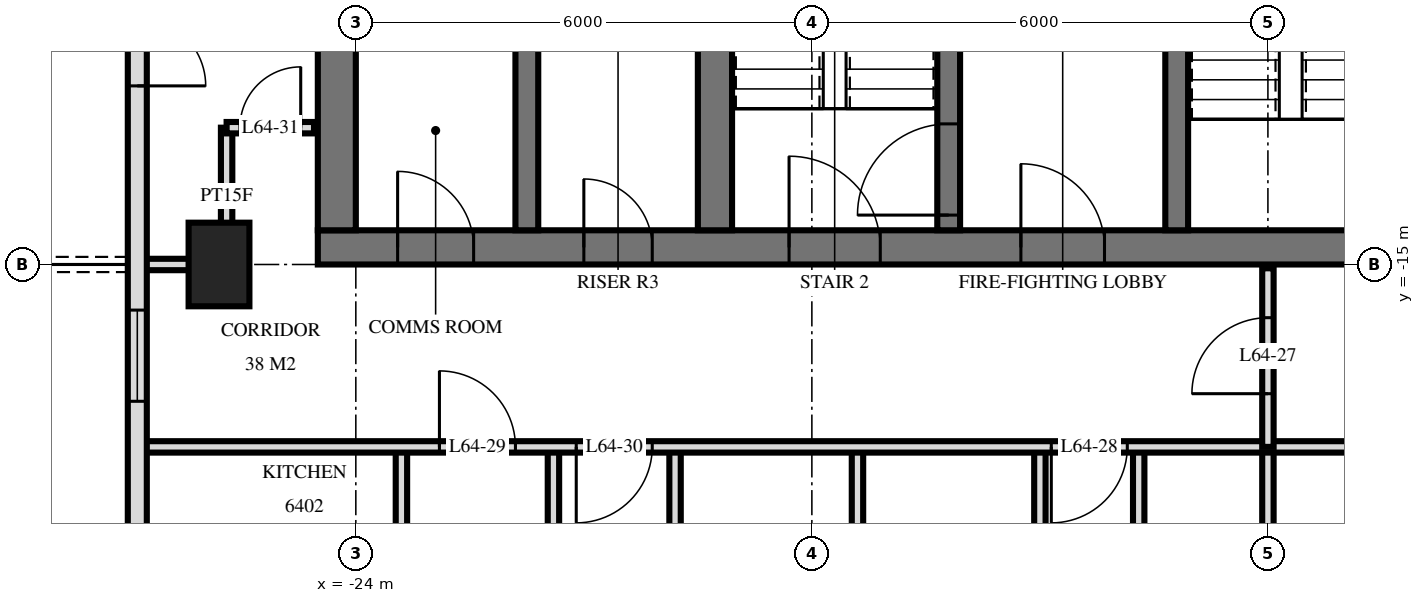
"""IFC4 building model, lengths in metres.
Left out: names, types, materials, properties, quantities, classifications, styles, units other than length and angle.
Written with IfcOpenShell. Run it as: python <this file> out.ifc"""

import sys

from ifc_helpers import new_model, si_unit, direction, frame, frame_2d, origin, origin_2d, place, context, subcontext, project, spatial, rectangle, extrude, element, fill, save


model = new_model("IFC4")
c1 = context("Model", 3, precision=1e-05, world=origin(), true_north=direction((0.0, 1.0)))
c2 = subcontext(c1, "Body", "Model", "MODEL_VIEW")
j1 = project(units=[si_unit("LENGTHUNIT", "METRE"), si_unit("PLANEANGLEUNIT", "RADIAN")], contexts=[c1])
p1 = place(None, origin())
s1 = spatial("IfcSite", under=j1, at=p1, CompositionType="ELEMENT")
p2 = place(p1, origin())
s2 = spatial("IfcBuilding", under=s1, at=p2, CompositionType="ELEMENT")
p3 = place(p2, frame((0.0, 0.0, 243.1)))
s3 = spatial("IfcBuildingStorey", under=s2, at=p3, CompositionType="ELEMENT", Elevation=243.1)
p4 = place(p3, frame((-25.8, -15.0, 0.0), z_axis=(0.0, 0.0, 1.0), x_axis=(0.0, 1.0, 0.0)))
e1 = element("IfcColumn", 1, at=p4, inside=s3, PredefinedType="COLUMN", context=c2, shape_type="SweptSolid", body=[
    extrude(rectangle(XDim=1.1, YDim=0.8, at=origin_2d()), origin(), (0.0, 0.0, 1.0), 3.5),
])
p5 = place(p3, frame((-24.5, -14.775, 0.0), z_axis=(0.0, 0.0, 1.0), x_axis=(1.0, 0.0, 0.0)))
e2 = element("IfcWall", 2, at=p5, inside=s3, PredefinedType="SHEAR", context=c2, shape_type="SweptSolid", body=[
    extrude(rectangle(XDim=14.5, YDim=0.45, at=frame_2d((7.25, 0.0))), origin(), (0.0, 0.0, 1.0), 3.5),
])
p6 = place(p5, frame((6.2, 0.0, 0.0)))
e3 = element("IfcOpeningElement", 3, at=p6, cuts=e2, PredefinedType="OPENING", context=c2, shape_type="SweptSolid", body=[
    extrude(rectangle(XDim=1.2, YDim=2.1, at=frame_2d((0.6, 1.05))), frame((0.0, 0.235, 0.0), z_axis=(0.0, -1.0, 0.0), x_axis=(1.0, 0.0, 0.0)), (0.0, 0.0, 1.0), 0.47),
])
p7 = place(p5, frame((9.25, 0.0, 0.0)))
e4 = element("IfcOpeningElement", 4, at=p7, cuts=e2, PredefinedType="OPENING", context=c2, shape_type="SweptSolid", body=[
    extrude(rectangle(XDim=1.1, YDim=2.1, at=frame_2d((0.55, 1.05))), frame((0.0, 0.235, 0.0), z_axis=(0.0, -1.0, 0.0), x_axis=(1.0, 0.0, 0.0)), (0.0, 0.0, 1.0), 0.47),
])
p8 = place(p5, frame((3.5, 0.0, 0.0)))
e5 = element("IfcOpeningElement", 5, at=p8, cuts=e2, PredefinedType="OPENING", context=c2, shape_type="SweptSolid", body=[
    extrude(rectangle(XDim=0.9, YDim=2.1, at=frame_2d((0.45, 1.05))), frame((0.0, 0.235, 0.0), z_axis=(0.0, -1.0, 0.0), x_axis=(1.0, 0.0, 0.0)), (0.0, 0.0, 1.0), 0.47),
])
p9 = place(p5, frame((1.05, 0.0, 0.0)))
e6 = element("IfcOpeningElement", 6, at=p9, cuts=e2, PredefinedType="OPENING", context=c2, shape_type="SweptSolid", body=[
    extrude(rectangle(XDim=1.0, YDim=2.1, at=frame_2d((0.5, 1.05))), frame((0.0, 0.235, 0.0), z_axis=(0.0, -1.0, 0.0), x_axis=(1.0, 0.0, 0.0)), (0.0, 0.0, 1.0), 0.47),
])
p10 = place(p3, frame((-24.25, -14.55, 0.0), z_axis=(0.0, 0.0, 1.0), x_axis=(0.0, 1.0, 0.0)))
e7 = element("IfcWall", 7, at=p10, inside=s3, PredefinedType="SHEAR", context=c2, shape_type="SweptSolid", body=[
    extrude(rectangle(XDim=14.1, YDim=0.5, at=frame_2d((7.05, 0.0))), origin(), (0.0, 0.0, 1.0), 3.5),
])
p11 = place(p3, frame((-13.2, -14.55, 0.0), z_axis=(0.0, 0.0, 1.0), x_axis=(0.0, 1.0, 0.0)))
e8 = element("IfcWall", 8, at=p11, inside=s3, PredefinedType="SHEAR", context=c2, shape_type="SweptSolid", body=[
    extrude(rectangle(XDim=5.4, YDim=0.3, at=frame_2d((2.7, 0.0))), origin(), (0.0, 0.0, 1.0), 3.5),
])
p12 = place(p11, frame((4.0, 0.0, 0.0)))
e9 = element("IfcOpeningElement", 9, at=p12, cuts=e8, PredefinedType="OPENING", context=c2, shape_type="SweptSolid", body=[
    extrude(rectangle(XDim=1.2, YDim=2.1, at=frame_2d((0.6, 1.05))), frame((0.0, 0.16, 0.0), z_axis=(0.0, -1.0, 0.0), x_axis=(1.0, 0.0, 0.0)), (0.0, 0.0, 1.0), 0.32),
])
p13 = place(p3, frame((-16.2, -14.55, 0.0), z_axis=(0.0, 0.0, 1.0), x_axis=(0.0, 1.0, 0.0)))
e10 = element("IfcWall", 10, at=p13, inside=s3, PredefinedType="SHEAR", context=c2, shape_type="SweptSolid", body=[
    extrude(rectangle(XDim=5.4, YDim=0.3, at=frame_2d((2.7, 0.0))), origin(), (0.0, 0.0, 1.0), 3.5),
])
p14 = place(p13, frame((0.2, 0.0, 0.0)))
e11 = element("IfcOpeningElement", 11, at=p14, cuts=e10, PredefinedType="OPENING", context=c2, shape_type="SweptSolid", body=[
    extrude(rectangle(XDim=1.2, YDim=2.1, at=frame_2d((0.6, 1.05))), frame((0.0, 0.16, 0.0), z_axis=(0.0, -1.0, 0.0), x_axis=(1.0, 0.0, 0.0)), (0.0, 0.0, 1.0), 0.32),
])
p15 = place(p3, frame((-19.275, -14.55, 0.0), z_axis=(0.0, 0.0, 1.0), x_axis=(0.0, 1.0, 0.0)))
e12 = element("IfcWall", 12, at=p15, inside=s3, PredefinedType="SHEAR", context=c2, shape_type="SweptSolid", body=[
    extrude(rectangle(XDim=5.4, YDim=0.45, at=frame_2d((2.7, 0.0))), origin(), (0.0, 0.0, 1.0), 3.5),
])
p16 = place(p3, frame((-21.75, -14.55, 0.0), z_axis=(0.0, 0.0, 1.0), x_axis=(0.0, 1.0, 0.0)))
e13 = element("IfcWall", 13, at=p16, inside=s3, PredefinedType="SHEAR", context=c2, shape_type="SweptSolid", body=[
    extrude(rectangle(XDim=5.4, YDim=0.3, at=frame_2d((2.7, 0.0))), origin(), (0.0, 0.0, 1.0), 3.5),
])
p17 = place(p3, frame((-26.875, -3.325, 0.0), z_axis=(0.0, 0.0, 1.0), x_axis=(0.0, -1.0, 0.0)))
e14 = element("IfcWall", 14, at=p17, inside=s3, PredefinedType="SOLIDWALL", context=c2, shape_type="SweptSolid", body=[
    extrude(rectangle(XDim=21.551, YDim=0.25, at=frame_2d((10.775, 0.0))), origin(), (0.0, 0.0, 1.0), 3.2),
])
p18 = place(p17, frame((7.525, 0.0, 0.0)))
e15 = element("IfcOpeningElement", 15, at=p18, cuts=e14, PredefinedType="OPENING", context=c2, shape_type="SweptSolid", body=[
    extrude(rectangle(XDim=1.8, YDim=2.4, at=frame_2d((0.9, 1.2))), frame((0.0, 0.135, 0.0), z_axis=(0.0, -1.0, 0.0), x_axis=(1.0, 0.0, 0.0)), (0.0, 0.0, 1.0), 0.27),
])
p19 = place(p17, frame((12.275, 0.0, 0.9)))
e16 = element("IfcOpeningElement", 16, at=p19, cuts=e14, PredefinedType="OPENING", context=c2, shape_type="SweptSolid", body=[
    extrude(rectangle(XDim=1.2, YDim=1.5, at=frame_2d((0.6, 0.75))), frame((0.0, 0.135, 0.0), z_axis=(0.0, -1.0, 0.0), x_axis=(1.0, 0.0, 0.0)), (0.0, 0.0, 1.0), 0.27),
])
p20 = place(p17, frame((15.275, 0.0, 0.0)))
e17 = element("IfcOpeningElement", 17, at=p20, cuts=e14, PredefinedType="OPENING", context=c2, shape_type="SweptSolid", body=[
    extrude(rectangle(XDim=1.8, YDim=2.4, at=frame_2d((0.9, 1.2))), frame((0.0, 0.135, 0.0), z_axis=(0.0, -1.0, 0.0), x_axis=(1.0, 0.0, 0.0)), (0.0, 0.0, 1.0), 0.27),
])
p21 = place(p17, frame((18.875, 0.0, 0.0)))
e18 = element("IfcOpeningElement", 18, at=p21, cuts=e14, PredefinedType="OPENING", context=c2, shape_type="SweptSolid", body=[
    extrude(rectangle(XDim=1.8, YDim=2.4, at=frame_2d((0.9, 1.2))), frame((0.0, 0.135, 0.0), z_axis=(0.0, -1.0, 0.0), x_axis=(1.0, 0.0, 0.0)), (0.0, 0.0, 1.0), 0.27),
])
p22 = place(p3, frame((-12.0, -17.4, 0.0), z_axis=(0.0, 0.0, 1.0), x_axis=(0.0, 1.0, 0.0)))
e19 = element("IfcWall", 19, at=p22, inside=s3, PredefinedType="PARTITIONING", context=c2, shape_type="SweptSolid", body=[
    extrude(rectangle(XDim=2.35, YDim=0.15, at=frame_2d((1.175, 0.0))), origin(), (0.0, 0.0, 1.0), 3.22),
])
p23 = place(p22, frame((0.7, 0.0, 0.0)))
e20 = element("IfcOpeningElement", 20, at=p23, cuts=e19, PredefinedType="OPENING", context=c2, shape_type="SweptSolid", body=[
    extrude(rectangle(XDim=1.0, YDim=2.1, at=frame_2d((0.5, 1.05))), frame((0.0, 0.085, 0.0), z_axis=(0.0, -1.0, 0.0), x_axis=(1.0, 0.0, 0.0)), (0.0, 0.0, 1.0), 0.17),
])
p24 = place(p3, frame((-12.0, -29.22, 0.0), z_axis=(0.0, 0.0, 1.0), x_axis=(0.0, 1.0, 0.0)))
e21 = element("IfcWall", 21, at=p24, inside=s3, PredefinedType="PARTITIONING", context=c2, shape_type="SweptSolid", body=[
    extrude(rectangle(XDim=11.82, YDim=0.15, at=frame_2d((5.91, 0.0))), origin(), (0.0, 0.0, 1.0), 3.22),
])
p25 = place(p3, frame((-13.7, -21.6, 0.0), z_axis=(0.0, 0.0, 1.0), x_axis=(0.0, 1.0, 0.0)))
e22 = element("IfcWall", 22, at=p25, inside=s3, PredefinedType="PARTITIONING", context=c2, shape_type="SweptSolid", body=[
    extrude(rectangle(XDim=4.2, YDim=0.15, at=frame_2d((2.1, 0.0))), origin(), (0.0, 0.0, 1.0), 3.22),
])
p26 = place(p25, frame((1.72, 0.0, 0.0)))
e23 = element("IfcOpeningElement", 23, at=p26, cuts=e22, PredefinedType="OPENING", context=c2, shape_type="SweptSolid", body=[
    extrude(rectangle(XDim=0.8, YDim=2.1, at=frame_2d((0.4, 1.05))), frame((0.0, 0.085, 0.0), z_axis=(0.0, -1.0, 0.0), x_axis=(1.0, 0.0, 0.0)), (0.0, 0.0, 1.0), 0.17),
])
p27 = place(p3, frame((-15.0, -29.22, 0.0), z_axis=(0.0, 0.0, 1.0), x_axis=(0.0, 1.0, 0.0)))
e24 = element("IfcWall", 24, at=p27, inside=s3, PredefinedType="PARTITIONING", context=c2, shape_type="SweptSolid", body=[
    extrude(rectangle(XDim=11.82, YDim=0.15, at=frame_2d((5.91, 0.0))), origin(), (0.0, 0.0, 1.0), 3.22),
])
for number, where, z_axis, x_axis in (
    (25, (-17.4, -21.6, 0.0), (0.0, 0.0, 1.0), (0.0, 1.0, 0.0)),
    (26, (-19.8, -21.6, 0.0), (0.0, 0.0, 1.0), (0.0, 1.0, 0.0)),
    (27, (-21.4, -21.6, 0.0), (0.0, 0.0, 1.0), (0.0, 1.0, 0.0)),
):
    element("IfcWall", number, at=place(p3, frame(where, z_axis=z_axis, x_axis=x_axis)), inside=s3, PredefinedType="PARTITIONING", context=c2, shape_type="SweptSolid", body=[
        extrude(rectangle(XDim=4.2, YDim=0.15, at=frame_2d((2.1, 0.0))), origin(), (0.0, 0.0, 1.0), 3.22),
    ])
p28 = place(p3, frame((-23.4, -21.6, 0.0), z_axis=(0.0, 0.0, 1.0), x_axis=(0.0, 1.0, 0.0)))
e28 = element("IfcWall", 28, at=p28, inside=s3, PredefinedType="PARTITIONING", context=c2, shape_type="SweptSolid", body=[
    extrude(rectangle(XDim=4.2, YDim=0.15, at=frame_2d((2.1, 0.0))), origin(), (0.0, 0.0, 1.0), 3.22),
])
p29 = place(p28, frame((1.58, 0.0, 0.0)))
e29 = element("IfcOpeningElement", 29, at=p29, cuts=e28, PredefinedType="OPENING", context=c2, shape_type="SweptSolid", body=[
    extrude(rectangle(XDim=1.0, YDim=2.1, at=frame_2d((0.5, 1.05))), frame((0.0, 0.085, 0.0), z_axis=(0.0, -1.0, 0.0), x_axis=(1.0, 0.0, 0.0)), (0.0, 0.0, 1.0), 0.17),
])
p30 = place(p3, frame((-25.7, -15.0, 0.0), z_axis=(0.0, 0.0, 1.0), x_axis=(0.0, 1.0, 0.0)))
e30 = element("IfcWall", 30, at=p30, inside=s3, PredefinedType="PARTITIONING", context=c2, shape_type="SweptSolid", body=[
    extrude(rectangle(XDim=1.8, YDim=0.15, at=frame_2d((0.9, 0.0))), origin(), (0.0, 0.0, 1.0), 3.22),
])
p31 = place(p3, frame((-26.82, -17.4, 0.0), z_axis=(0.0, 0.0, 1.0), x_axis=(1.0, 0.0, 0.0)))
e31 = element("IfcWall", 31, at=p31, inside=s3, PredefinedType="PARTITIONING", context=c2, shape_type="SweptSolid", body=[
    extrude(rectangle(XDim=53.64, YDim=0.15, at=frame_2d((26.82, 0.0))), origin(), (0.0, 0.0, 1.0), 3.22),
])
p32 = place(p31, frame((11.97, 0.0, 0.0)))
e32 = element("IfcOpeningElement", 32, at=p32, cuts=e31, PredefinedType="OPENING", context=c2, shape_type="SweptSolid", body=[
    extrude(rectangle(XDim=1.0, YDim=2.1, at=frame_2d((0.5, 1.05))), frame((0.0, 0.085, 0.0), z_axis=(0.0, -1.0, 0.0), x_axis=(1.0, 0.0, 0.0)), (0.0, 0.0, 1.0), 0.17),
])
p33 = place(p31, frame((3.92, 0.0, 0.0)))
e33 = element("IfcOpeningElement", 33, at=p33, cuts=e31, PredefinedType="OPENING", context=c2, shape_type="SweptSolid", body=[
    extrude(rectangle(XDim=1.0, YDim=2.1, at=frame_2d((0.5, 1.05))), frame((0.0, 0.085, 0.0), z_axis=(0.0, -1.0, 0.0), x_axis=(1.0, 0.0, 0.0)), (0.0, 0.0, 1.0), 0.17),
])
p34 = place(p31, frame((5.72, 0.0, 0.0)))
e34 = element("IfcOpeningElement", 34, at=p34, cuts=e31, PredefinedType="OPENING", context=c2, shape_type="SweptSolid", body=[
    extrude(rectangle(XDim=1.0, YDim=2.1, at=frame_2d((0.5, 1.05))), frame((0.0, 0.085, 0.0), z_axis=(0.0, -1.0, 0.0), x_axis=(1.0, 0.0, 0.0)), (0.0, 0.0, 1.0), 0.17),
])
p35 = place(p31, frame((47.72, 0.0, 0.0)))
e35 = element("IfcOpeningElement", 35, at=p35, cuts=e31, PredefinedType="OPENING", context=c2, shape_type="SweptSolid", body=[
    extrude(rectangle(XDim=1.0, YDim=2.1, at=frame_2d((0.5, 1.05))), frame((0.0, 0.085, 0.0), z_axis=(0.0, -1.0, 0.0), x_axis=(1.0, 0.0, 0.0)), (0.0, 0.0, 1.0), 0.17),
])
p36 = place(p31, frame((51.02, 0.0, 0.0)))
e36 = element("IfcOpeningElement", 36, at=p36, cuts=e31, PredefinedType="OPENING", context=c2, shape_type="SweptSolid", body=[
    extrude(rectangle(XDim=1.0, YDim=2.1, at=frame_2d((0.5, 1.05))), frame((0.0, 0.085, 0.0), z_axis=(0.0, -1.0, 0.0), x_axis=(1.0, 0.0, 0.0)), (0.0, 0.0, 1.0), 0.17),
])
p37 = place(p31, frame((17.32, 0.0, 0.0)))
e37 = element("IfcOpeningElement", 37, at=p37, cuts=e31, PredefinedType="OPENING", context=c2, shape_type="SweptSolid", body=[
    extrude(rectangle(XDim=1.0, YDim=2.1, at=frame_2d((0.5, 1.05))), frame((0.0, 0.085, 0.0), z_axis=(0.0, -1.0, 0.0), x_axis=(1.0, 0.0, 0.0)), (0.0, 0.0, 1.0), 0.17),
])
p38 = place(p31, frame((23.32, 0.0, 0.0)))
e38 = element("IfcOpeningElement", 38, at=p38, cuts=e31, PredefinedType="OPENING", context=c2, shape_type="SweptSolid", body=[
    extrude(rectangle(XDim=1.0, YDim=2.1, at=frame_2d((0.5, 1.05))), frame((0.0, 0.085, 0.0), z_axis=(0.0, -1.0, 0.0), x_axis=(1.0, 0.0, 0.0)), (0.0, 0.0, 1.0), 0.17),
])
p39 = place(p31, frame((29.32, 0.0, 0.0)))
e39 = element("IfcOpeningElement", 39, at=p39, cuts=e31, PredefinedType="OPENING", context=c2, shape_type="SweptSolid", body=[
    extrude(rectangle(XDim=1.0, YDim=2.1, at=frame_2d((0.5, 1.05))), frame((0.0, 0.085, 0.0), z_axis=(0.0, -1.0, 0.0), x_axis=(1.0, 0.0, 0.0)), (0.0, 0.0, 1.0), 0.17),
])
p40 = place(p31, frame((35.32, 0.0, 0.0)))
e40 = element("IfcOpeningElement", 40, at=p40, cuts=e31, PredefinedType="OPENING", context=c2, shape_type="SweptSolid", body=[
    extrude(rectangle(XDim=1.0, YDim=2.1, at=frame_2d((0.5, 1.05))), frame((0.0, 0.085, 0.0), z_axis=(0.0, -1.0, 0.0), x_axis=(1.0, 0.0, 0.0)), (0.0, 0.0, 1.0), 0.17),
])
p41 = place(p3, frame((-26.82, -15.0, 0.0), z_axis=(0.0, 0.0, 1.0), x_axis=(1.0, 0.0, 0.0)))
e41 = element("IfcWall", 41, at=p41, inside=s3, PredefinedType="PARTITIONING", context=c2, shape_type="SweptSolid", body=[
    extrude(rectangle(XDim=1.12, YDim=0.15, at=frame_2d((0.56, 0.0))), origin(), (0.0, 0.0, 1.0), 3.22),
])
p42 = place(p3, frame((-25.7, -13.2, 0.0), z_axis=(0.0, 0.0, 1.0), x_axis=(1.0, 0.0, 0.0)))
e42 = element("IfcWall", 42, at=p42, inside=s3, PredefinedType="PARTITIONING", context=c2, shape_type="SweptSolid", body=[
    extrude(rectangle(XDim=1.15, YDim=0.15, at=frame_2d((0.575, 0.0))), origin(), (0.0, 0.0, 1.0), 3.22),
])
p43 = place(p42, frame((0.175, 0.0, 0.0)))
e43 = element("IfcOpeningElement", 43, at=p43, cuts=e42, PredefinedType="OPENING", context=c2, shape_type="SweptSolid", body=[
    extrude(rectangle(XDim=0.8, YDim=2.1, at=frame_2d((0.4, 1.05))), frame((0.0, 0.085, 0.0), z_axis=(0.0, -1.0, 0.0), x_axis=(1.0, 0.0, 0.0)), (0.0, 0.0, 1.0), 0.17),
])
p44 = place(p18, origin())
e44 = element("IfcDoor", 44, at=p44, inside=s3, OperationType="DOUBLE_DOOR_SINGLE_SWING", PredefinedType="DOOR", context=c2, shape_type="SweptSolid", body=[
    extrude(rectangle(XDim=1.8, YDim=2.4, at=frame_2d((0.9, 1.2))), frame((0.0, 0.025, 0.0), z_axis=(0.0, -1.0, 0.0), x_axis=(1.0, 0.0, 0.0)), (0.0, 0.0, 1.0), 0.05),
])
fill(e15, e44)
p45 = place(p19, origin())
e45 = element("IfcWindow", 45, at=p45, inside=s3, PartitioningType="SINGLE_PANEL", PredefinedType="WINDOW", context=c2, shape_type="SweptSolid", body=[
    extrude(rectangle(XDim=1.2, YDim=1.5, at=frame_2d((0.6, 0.75))), frame((0.0, 0.03, 0.0), z_axis=(0.0, -1.0, 0.0), x_axis=(1.0, 0.0, 0.0)), (0.0, 0.0, 1.0), 0.06),
])
fill(e16, e45)
p46 = place(p6, origin())
e46 = element("IfcDoor", 46, at=p46, inside=s3, OperationType="SINGLE_SWING_RIGHT", PredefinedType="DOOR", context=c2, shape_type="SweptSolid", body=[
    extrude(rectangle(XDim=1.2, YDim=2.1, at=frame_2d((0.6, 1.05))), frame((0.0, 0.025, 0.0), z_axis=(0.0, -1.0, 0.0), x_axis=(1.0, 0.0, 0.0)), (0.0, 0.0, 1.0), 0.05),
])
fill(e3, e46)
p47 = place(p7, origin())
e47 = element("IfcDoor", 47, at=p47, inside=s3, OperationType="SINGLE_SWING_RIGHT", PredefinedType="DOOR", context=c2, shape_type="SweptSolid", body=[
    extrude(rectangle(XDim=1.1, YDim=2.1, at=frame_2d((0.55, 1.05))), frame((0.0, 0.025, 0.0), z_axis=(0.0, -1.0, 0.0), x_axis=(1.0, 0.0, 0.0)), (0.0, 0.0, 1.0), 0.05),
])
fill(e4, e47)
p48 = place(p8, origin())
e48 = element("IfcDoor", 48, at=p48, inside=s3, OperationType="SINGLE_SWING_RIGHT", PredefinedType="DOOR", context=c2, shape_type="SweptSolid", body=[
    extrude(rectangle(XDim=0.9, YDim=2.1, at=frame_2d((0.45, 1.05))), frame((0.0, 0.025, 0.0), z_axis=(0.0, -1.0, 0.0), x_axis=(1.0, 0.0, 0.0)), (0.0, 0.0, 1.0), 0.05),
])
fill(e5, e48)
p49 = place(p9, origin())
e49 = element("IfcDoor", 49, at=p49, inside=s3, OperationType="SINGLE_SWING_RIGHT", PredefinedType="DOOR", context=c2, shape_type="SweptSolid", body=[
    extrude(rectangle(XDim=1.0, YDim=2.1, at=frame_2d((0.5, 1.05))), frame((0.0, 0.025, 0.0), z_axis=(0.0, -1.0, 0.0), x_axis=(1.0, 0.0, 0.0)), (0.0, 0.0, 1.0), 0.05),
])
fill(e6, e49)
p50 = place(p14, origin())
e50 = element("IfcDoor", 50, at=p50, inside=s3, OperationType="SINGLE_SWING_RIGHT", PredefinedType="DOOR", context=c2, shape_type="SweptSolid", body=[
    extrude(rectangle(XDim=1.2, YDim=2.1, at=frame_2d((0.6, 1.05))), frame((0.0, 0.025, 0.0), z_axis=(0.0, -1.0, 0.0), x_axis=(1.0, 0.0, 0.0)), (0.0, 0.0, 1.0), 0.05),
])
fill(e11, e50)
p51 = place(p23, origin())
e51 = element("IfcDoor", 51, at=p51, inside=s3, OperationType="SINGLE_SWING_RIGHT", PredefinedType="DOOR", context=c2, shape_type="SweptSolid", body=[
    extrude(rectangle(XDim=1.0, YDim=2.1, at=frame_2d((0.5, 1.05))), frame((0.0, 0.025, 0.0), z_axis=(0.0, -1.0, 0.0), x_axis=(1.0, 0.0, 0.0)), (0.0, 0.0, 1.0), 0.05),
])
fill(e20, e51)
p52 = place(p32, frame((0.5, 0.0, 0.0), z_axis=(0.0, 0.0, 1.0), x_axis=(-1.0, 0.0, 0.0)))
e52 = element("IfcDoor", 52, at=p52, inside=s3, OperationType="SINGLE_SWING_LEFT", PredefinedType="DOOR", context=c2, shape_type="SweptSolid", body=[
    extrude(rectangle(XDim=1.0, YDim=2.1, at=frame_2d((0.0, 1.05))), frame((0.0, -0.025, 0.0), z_axis=(0.0, 1.0, 0.0), x_axis=(-1.0, 0.0, 0.0)), (0.0, 0.0, 1.0), 0.05),
])
fill(e32, e52)
p53 = place(p33, origin())
e53 = element("IfcDoor", 53, at=p53, inside=s3, OperationType="SINGLE_SWING_RIGHT", PredefinedType="DOOR", context=c2, shape_type="SweptSolid", body=[
    extrude(rectangle(XDim=1.0, YDim=2.1, at=frame_2d((0.5, 1.05))), frame((0.0, 0.025, 0.0), z_axis=(0.0, -1.0, 0.0), x_axis=(1.0, 0.0, 0.0)), (0.0, 0.0, 1.0), 0.05),
])
fill(e33, e53)
p54 = place(p34, frame((0.5, 0.0, 0.0), z_axis=(0.0, 0.0, 1.0), x_axis=(-1.0, 0.0, 0.0)))
e54 = element("IfcDoor", 54, at=p54, inside=s3, OperationType="SINGLE_SWING_LEFT", PredefinedType="DOOR", context=c2, shape_type="SweptSolid", body=[
    extrude(rectangle(XDim=1.0, YDim=2.1, at=frame_2d((0.0, 1.05))), frame((0.0, -0.025, 0.0), z_axis=(0.0, 1.0, 0.0), x_axis=(-1.0, 0.0, 0.0)), (0.0, 0.0, 1.0), 0.05),
])
fill(e34, e54)
p55 = place(p43, origin())
e55 = element("IfcDoor", 55, at=p55, inside=s3, OperationType="SINGLE_SWING_LEFT", PredefinedType="DOOR", context=c2, shape_type="SweptSolid", body=[
    extrude(rectangle(XDim=0.8, YDim=2.1, at=frame_2d((0.4, 1.05))), frame((0.0, 0.025, 0.0), z_axis=(0.0, -1.0, 0.0), x_axis=(1.0, 0.0, 0.0)), (0.0, 0.0, 1.0), 0.05),
])
fill(e43, e55)
save(model, sys.argv[1])
